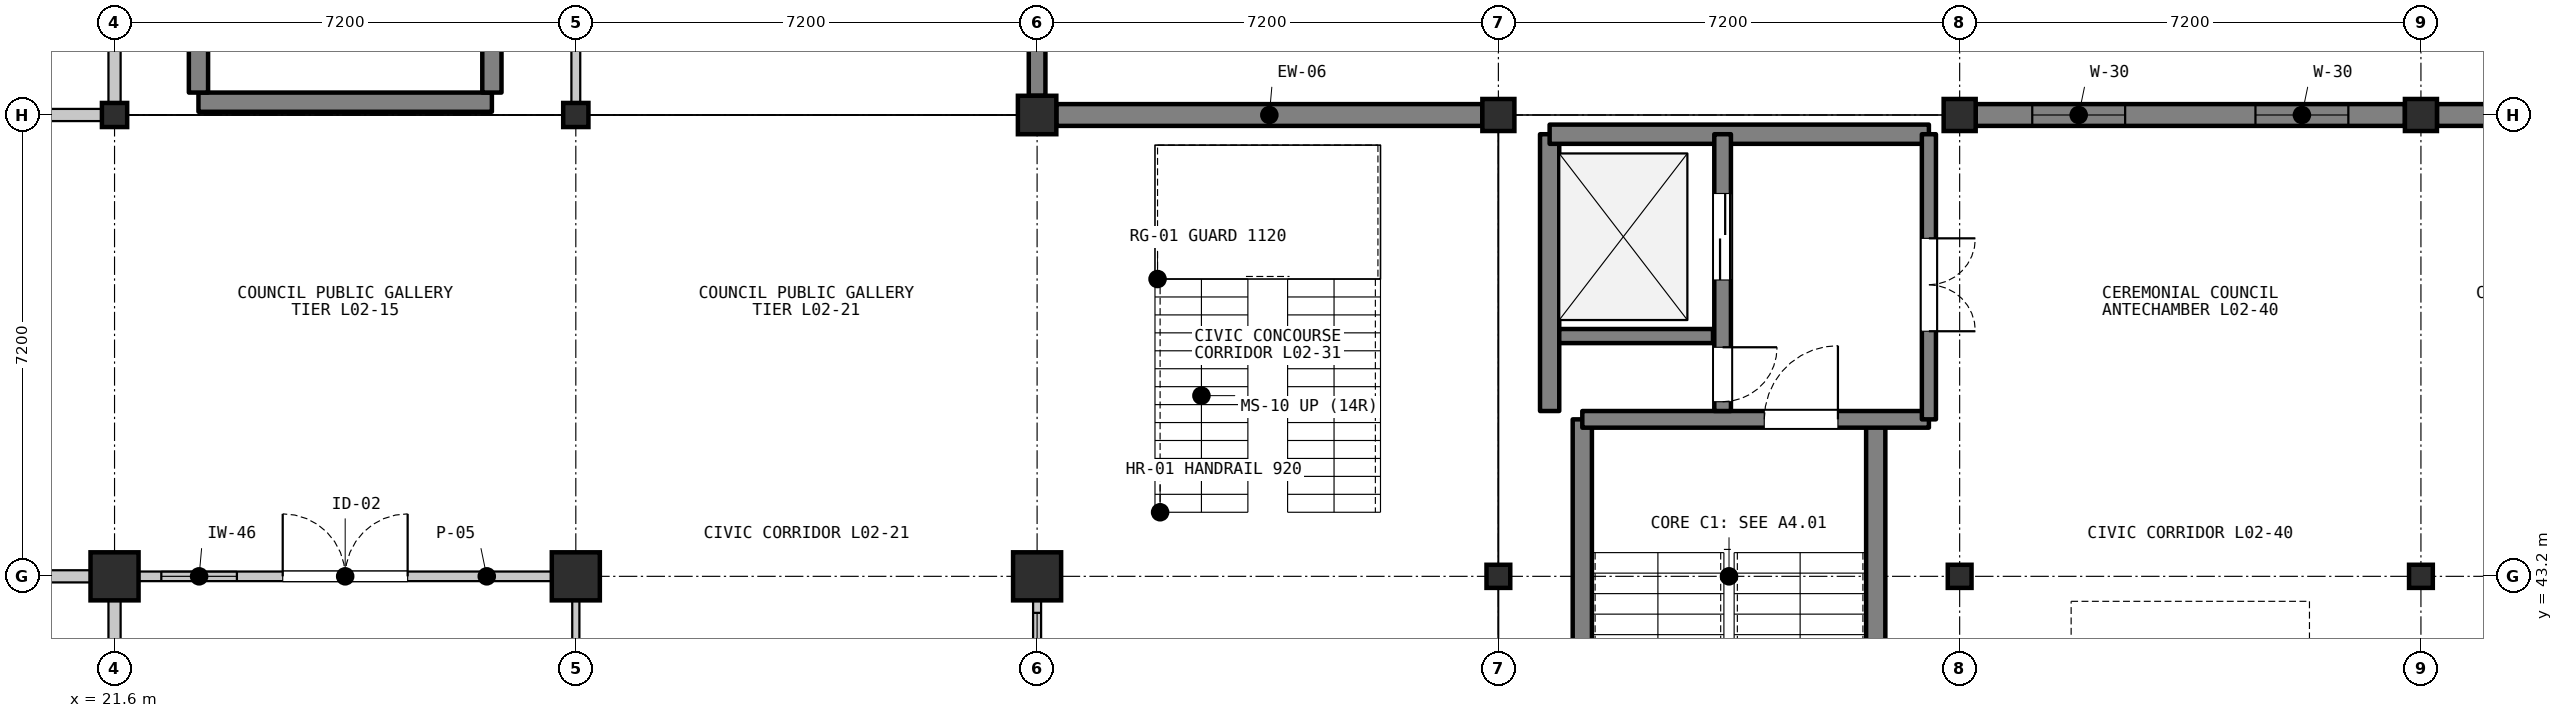
"""IFC4 building model, lengths in metres.
Left out: names, types, materials, properties, quantities, classifications, styles, units other than length and angle.
Written with IfcOpenShell. Run it as: python <this file> out.ifc"""

import sys

from ifc_helpers import new_model, si_unit, direction, frame, frame_2d, origin, origin_2d, place, context, subcontext, project, spatial, rectangle, i_section, extrude, element, fill, save


model = new_model("IFC4")
c1 = context("Model", 3, precision=1e-05, world=origin(), true_north=direction((0.0, 1.0)))
c2 = subcontext(c1, "Body", "Model", "MODEL_VIEW")
j1 = project(units=[si_unit("LENGTHUNIT", "METRE"), si_unit("PLANEANGLEUNIT", "RADIAN")], contexts=[c1])
p1 = place(None, origin())
s1 = spatial("IfcSite", under=j1, at=p1, CompositionType="ELEMENT")
p2 = place(p1, origin())
s2 = spatial("IfcBuilding", under=s1, at=p2, CompositionType="ELEMENT")
p3 = place(p2, frame((0.0, 0.0, 5.4)))
s3 = spatial("IfcBuildingStorey", under=s2, at=p3, CompositionType="ELEMENT", Elevation=5.4)
p4 = place(p3, frame((21.6, 43.2, 0.0), z_axis=(0.0, 0.0, 1.0), x_axis=(1.0, 0.0, 0.0)))
e1 = element("IfcColumn", 1, at=p4, inside=s3, PredefinedType="COLUMN", context=c2, shape_type="SweptSolid", body=[
    extrude(rectangle(XDim=0.75, YDim=0.75, at=origin_2d()), origin(), (0.0, 0.0, 1.0), 4.5),
])
p5 = place(p3, frame((21.6, 50.4, 0.0), z_axis=(0.0, 0.0, 1.0), x_axis=(1.0, 0.0, 0.0)))
e2 = element("IfcColumn", 2, at=p5, inside=s3, PredefinedType="COLUMN", context=c2, shape_type="SweptSolid", body=[
    extrude(i_section(OverallWidth=0.394, OverallDepth=0.376, WebThickness=0.017, FlangeThickness=0.028, FilletRadius=0.015, at=origin_2d()), origin(), (0.0, 0.0, 1.0), 4.5),
])
p6 = place(p3, frame((28.8, 43.2, 0.0), z_axis=(0.0, 0.0, 1.0), x_axis=(1.0, 0.0, 0.0)))
e3 = element("IfcColumn", 3, at=p6, inside=s3, PredefinedType="COLUMN", context=c2, shape_type="SweptSolid", body=[
    extrude(rectangle(XDim=0.75, YDim=0.75, at=origin_2d()), origin(), (0.0, 0.0, 1.0), 4.5),
])
p7 = place(p3, frame((28.8, 50.4, 0.0), z_axis=(0.0, 0.0, 1.0), x_axis=(1.0, 0.0, 0.0)))
e4 = element("IfcColumn", 4, at=p7, inside=s3, PredefinedType="COLUMN", context=c2, shape_type="SweptSolid", body=[
    extrude(i_section(OverallWidth=0.394, OverallDepth=0.376, WebThickness=0.017, FlangeThickness=0.028, FilletRadius=0.015, at=origin_2d()), origin(), (0.0, 0.0, 1.0), 4.5),
])
p8 = place(p3, frame((36.0, 43.2, 0.0), z_axis=(0.0, 0.0, 1.0), x_axis=(1.0, 0.0, 0.0)))
e5 = element("IfcColumn", 5, at=p8, inside=s3, PredefinedType="COLUMN", context=c2, shape_type="SweptSolid", body=[
    extrude(rectangle(XDim=0.75, YDim=0.75, at=origin_2d()), origin(), (0.0, 0.0, 1.0), 4.5),
])
p9 = place(p3, frame((36.0, 50.4, 0.0), z_axis=(0.0, 0.0, 1.0), x_axis=(1.0, 0.0, 0.0)))
e6 = element("IfcColumn", 6, at=p9, inside=s3, PredefinedType="COLUMN", context=c2, shape_type="SweptSolid", body=[
    extrude(rectangle(XDim=0.6, YDim=0.6, at=origin_2d()), origin(), (0.0, 0.0, 1.0), 4.5),
])
p10 = place(p3, frame((43.2, 43.2, 0.0), z_axis=(0.0, 0.0, 1.0), x_axis=(1.0, 0.0, 0.0)))
e7 = element("IfcColumn", 7, at=p10, inside=s3, PredefinedType="COLUMN", context=c2, shape_type="SweptSolid", body=[
    extrude(i_section(OverallWidth=0.371, OverallDepth=0.361, WebThickness=0.012, FlangeThickness=0.02, FilletRadius=0.015, at=origin_2d()), origin(), (0.0, 0.0, 1.0), 4.5),
])
p11 = place(p3, frame((43.2, 50.4, 0.0), z_axis=(0.0, 0.0, 1.0), x_axis=(1.0, 0.0, 0.0)))
e8 = element("IfcColumn", 8, at=p11, inside=s3, PredefinedType="COLUMN", context=c2, shape_type="SweptSolid", body=[
    extrude(rectangle(XDim=0.5, YDim=0.5, at=origin_2d()), origin(), (0.0, 0.0, 1.0), 4.5),
])
p12 = place(p3, frame((50.4, 43.2, 0.0), z_axis=(0.0, 0.0, 1.0), x_axis=(1.0, 0.0, 0.0)))
e9 = element("IfcColumn", 9, at=p12, inside=s3, PredefinedType="COLUMN", context=c2, shape_type="SweptSolid", body=[
    extrude(i_section(OverallWidth=0.371, OverallDepth=0.361, WebThickness=0.012, FlangeThickness=0.02, FilletRadius=0.015, at=origin_2d()), origin(), (0.0, 0.0, 1.0), 4.5),
])
p13 = place(p3, frame((50.4, 50.4, 0.0), z_axis=(0.0, 0.0, 1.0), x_axis=(1.0, 0.0, 0.0)))
e10 = element("IfcColumn", 10, at=p13, inside=s3, PredefinedType="COLUMN", context=c2, shape_type="SweptSolid", body=[
    extrude(rectangle(XDim=0.5, YDim=0.5, at=origin_2d()), origin(), (0.0, 0.0, 1.0), 4.5),
])
p14 = place(p3, frame((57.6, 43.2, 0.0), z_axis=(0.0, 0.0, 1.0), x_axis=(1.0, 0.0, 0.0)))
e11 = element("IfcColumn", 11, at=p14, inside=s3, PredefinedType="COLUMN", context=c2, shape_type="SweptSolid", body=[
    extrude(i_section(OverallWidth=0.371, OverallDepth=0.361, WebThickness=0.012, FlangeThickness=0.02, FilletRadius=0.015, at=origin_2d()), origin(), (0.0, 0.0, 1.0), 4.5),
])
p15 = place(p3, frame((57.6, 50.4, 0.0), z_axis=(0.0, 0.0, 1.0), x_axis=(1.0, 0.0, 0.0)))
e12 = element("IfcColumn", 12, at=p15, inside=s3, PredefinedType="COLUMN", context=c2, shape_type="SweptSolid", body=[
    extrude(rectangle(XDim=0.5, YDim=0.5, at=origin_2d()), origin(), (0.0, 0.0, 1.0), 4.5),
])
p16 = place(p3, frame((36.0, 57.3, 0.0), z_axis=(0.0, 0.0, 1.0), x_axis=(0.0, -1.0, 0.0)))
e13 = element("IfcWall", 13, at=p16, inside=s3, PredefinedType="SOLIDWALL", context=c2, shape_type="SweptSolid", body=[
    extrude(rectangle(XDim=6.6, YDim=0.26, at=frame_2d((3.3, 0.0))), origin(), (0.0, 0.0, 1.0), 3.767),
])
p17 = place(p16, frame((2.225, 0.0, 0.95)))
e14 = element("IfcOpeningElement", 14, at=p17, cuts=e13, PredefinedType="OPENING", context=c2, shape_type="SweptSolid", body=[
    extrude(rectangle(XDim=2.15, YDim=1.75, at=frame_2d((1.075, 0.875))), frame((0.0, 0.14, 0.0), z_axis=(0.0, -1.0, 0.0), x_axis=(1.0, 0.0, 0.0)), (0.0, 0.0, 1.0), 0.28),
])
p18 = place(p3, frame((36.3, 50.4, 0.0), z_axis=(0.0, 0.0, 1.0), x_axis=(1.0, 0.0, 0.0)))
e15 = element("IfcWall", 15, at=p18, inside=s3, PredefinedType="SOLIDWALL", context=c2, shape_type="SweptSolid", body=[
    extrude(rectangle(XDim=6.65, YDim=0.34, at=frame_2d((3.325, 0.0))), origin(), (0.0, 0.0, 1.0), 3.698),
])
p19 = place(p3, frame((50.65, 50.4, 0.0), z_axis=(0.0, 0.0, 1.0), x_axis=(1.0, 0.0, 0.0)))
e16 = element("IfcWall", 16, at=p19, inside=s3, PredefinedType="SOLIDWALL", context=c2, shape_type="SweptSolid", body=[
    extrude(rectangle(XDim=6.7, YDim=0.34, at=frame_2d((3.35, 0.0))), origin(), (0.0, 0.0, 1.0), 3.698),
])
p20 = place(p19, frame((0.883, 0.0, 0.95)))
e17 = element("IfcOpeningElement", 17, at=p20, cuts=e16, PredefinedType="OPENING", context=c2, shape_type="SweptSolid", body=[
    extrude(rectangle(XDim=1.45, YDim=2.15, at=frame_2d((0.725, 1.075))), frame((0.0, 0.18, 0.0), z_axis=(0.0, -1.0, 0.0), x_axis=(1.0, 0.0, 0.0)), (0.0, 0.0, 1.0), 0.36),
])
p21 = place(p19, frame((4.367, 0.0, 0.95)))
e18 = element("IfcOpeningElement", 18, at=p21, cuts=e16, PredefinedType="OPENING", context=c2, shape_type="SweptSolid", body=[
    extrude(rectangle(XDim=1.45, YDim=2.15, at=frame_2d((0.725, 1.075))), frame((0.0, 0.18, 0.0), z_axis=(0.0, -1.0, 0.0), x_axis=(1.0, 0.0, 0.0)), (0.0, 0.0, 1.0), 0.36),
])
p22 = place(p3, frame((57.85, 50.4, 0.0), z_axis=(0.0, 0.0, 1.0), x_axis=(1.0, 0.0, 0.0)))
e19 = element("IfcWall", 19, at=p22, inside=s3, PredefinedType="SOLIDWALL", context=c2, shape_type="SweptSolid", body=[
    extrude(rectangle(XDim=6.65, YDim=0.34, at=frame_2d((3.325, 0.0))), origin(), (0.0, 0.0, 1.0), 3.698),
])
for number, where, z_axis, x_axis in (
    (20, (44.51, 36.35, 0.0), (0.0, 0.0, 1.0), (0.0, 1.0, 0.0)),
    (21, (49.09, 36.35, 0.0), (0.0, 0.0, 1.0), (0.0, 1.0, 0.0)),
):
    element("IfcWall", number, at=place(p3, frame(where, z_axis=z_axis, x_axis=x_axis)), inside=s3, PredefinedType="SHEAR", context=c2, shape_type="SweptSolid", body=[
        extrude(rectangle(XDim=9.3, YDim=0.3, at=frame_2d((4.65, 0.0))), origin(), (0.0, 0.0, 1.0), 4.3),
    ])
p23 = place(p3, frame((44.51, 45.65, 0.0), z_axis=(0.0, 0.0, 1.0), x_axis=(1.0, 0.0, 0.0)))
e22 = element("IfcWall", 22, at=p23, inside=s3, PredefinedType="SHEAR", context=c2, shape_type="SweptSolid", body=[
    extrude(rectangle(XDim=5.41, YDim=0.26, at=frame_2d((2.705, 0.0))), origin(), (0.0, 0.0, 1.0), 4.3),
])
p24 = place(p23, frame((2.84, 0.0, 0.0)))
e23 = element("IfcOpeningElement", 23, at=p24, cuts=e22, PredefinedType="OPENING", context=c2, shape_type="SweptSolid", body=[
    extrude(rectangle(XDim=1.15, YDim=2.15, at=frame_2d((0.575, 1.075))), frame((0.0, 0.14, 0.0), z_axis=(0.0, -1.0, 0.0), x_axis=(1.0, 0.0, 0.0)), (0.0, 0.0, 1.0), 0.28),
])
p25 = place(p3, frame((44.0, 45.78, 0.0), z_axis=(0.0, 0.0, 1.0), x_axis=(0.0, 1.0, 0.0)))
e24 = element("IfcWall", 24, at=p25, inside=s3, PredefinedType="SHEAR", context=c2, shape_type="SweptSolid", body=[
    extrude(rectangle(XDim=4.32, YDim=0.3, at=frame_2d((2.16, 0.0))), origin(), (0.0, 0.0, 1.0), 4.3),
])
p26 = place(p3, frame((44.0, 50.1, 0.0), z_axis=(0.0, 0.0, 1.0), x_axis=(1.0, 0.0, 0.0)))
e25 = element("IfcWall", 25, at=p26, inside=s3, PredefinedType="SHEAR", context=c2, shape_type="SweptSolid", body=[
    extrude(rectangle(XDim=5.92, YDim=0.3, at=frame_2d((2.96, 0.0))), origin(), (0.0, 0.0, 1.0), 4.3),
])
p27 = place(p3, frame((44.15, 46.95, 0.0), z_axis=(0.0, 0.0, 1.0), x_axis=(1.0, 0.0, 0.0)))
e26 = element("IfcWall", 26, at=p27, inside=s3, PredefinedType="SHEAR", context=c2, shape_type="SweptSolid", body=[
    extrude(rectangle(XDim=2.4, YDim=0.22, at=frame_2d((1.2, 0.0))), origin(), (0.0, 0.0, 1.0), 4.3),
])
p28 = place(p3, frame((46.7, 50.1, 0.0), z_axis=(0.0, 0.0, 1.0), x_axis=(0.0, -1.0, 0.0)))
e27 = element("IfcWall", 27, at=p28, inside=s3, PredefinedType="SHEAR", context=c2, shape_type="SweptSolid", body=[
    extrude(rectangle(XDim=4.32, YDim=0.26, at=frame_2d((2.16, 0.0))), origin(), (0.0, 0.0, 1.0), 4.3),
])
p29 = place(p28, frame((0.925, 0.0, 0.0)))
e28 = element("IfcOpeningElement", 28, at=p29, cuts=e27, PredefinedType="OPENING", context=c2, shape_type="SweptSolid", body=[
    extrude(rectangle(XDim=1.35, YDim=2.2, at=frame_2d((0.675, 1.1))), frame((0.0, 0.14, 0.0), z_axis=(0.0, -1.0, 0.0), x_axis=(1.0, 0.0, 0.0)), (0.0, 0.0, 1.0), 0.28),
])
p30 = place(p28, frame((3.325, 0.0, 0.0)))
e29 = element("IfcOpeningElement", 29, at=p30, cuts=e27, PredefinedType="OPENING", context=c2, shape_type="SweptSolid", body=[
    extrude(rectangle(XDim=0.85, YDim=2.05, at=frame_2d((0.425, 1.025))), frame((0.0, 0.14, 0.0), z_axis=(0.0, -1.0, 0.0), x_axis=(1.0, 0.0, 0.0)), (0.0, 0.0, 1.0), 0.28),
])
p31 = place(p3, frame((49.92, 50.1, 0.0), z_axis=(0.0, 0.0, 1.0), x_axis=(0.0, -1.0, 0.0)))
e30 = element("IfcWall", 30, at=p31, inside=s3, PredefinedType="SHEAR", context=c2, shape_type="SweptSolid", body=[
    extrude(rectangle(XDim=4.45, YDim=0.22, at=frame_2d((2.225, 0.0))), origin(), (0.0, 0.0, 1.0), 4.3),
])
p32 = place(p31, frame((1.625, 0.0, 0.0)))
e31 = element("IfcOpeningElement", 31, at=p32, cuts=e30, PredefinedType="OPENING", context=c2, shape_type="SweptSolid", body=[
    extrude(rectangle(XDim=1.45, YDim=2.2, at=frame_2d((0.725, 1.1))), frame((0.0, 0.12, 0.0), z_axis=(0.0, -1.0, 0.0), x_axis=(1.0, 0.0, 0.0)), (0.0, 0.0, 1.0), 0.24),
])
p33 = place(p3, frame((22.91, 50.6, 0.0), z_axis=(0.0, 0.0, 1.0), x_axis=(1.0, 0.0, 0.0)))
e32 = element("IfcWall", 32, at=p33, inside=s3, PredefinedType="SHEAR", context=c2, shape_type="SweptSolid", body=[
    extrude(rectangle(XDim=4.58, YDim=0.3, at=frame_2d((2.29, 0.0))), origin(), (0.0, 0.0, 1.0), 4.3),
])
for number, where, z_axis, x_axis in (
    (33, (22.91, 50.75, 0.0), (0.0, 0.0, 1.0), (0.0, 1.0, 0.0)),
    (34, (27.49, 50.75, 0.0), (0.0, 0.0, 1.0), (0.0, 1.0, 0.0)),
):
    element("IfcWall", number, at=place(p3, frame(where, z_axis=z_axis, x_axis=x_axis)), inside=s3, PredefinedType="SHEAR", context=c2, shape_type="SweptSolid", body=[
        extrude(rectangle(XDim=9.3, YDim=0.3, at=frame_2d((4.65, 0.0))), origin(), (0.0, 0.0, 1.0), 4.3),
    ])
p34 = place(p3, frame((18.12, 43.2, 0.0), z_axis=(0.0, 0.0, 1.0), x_axis=(1.0, 0.0, 0.0)))
e35 = element("IfcWall", 35, at=p34, inside=s3, PredefinedType="PARTITIONING", context=c2, shape_type="SweptSolid", body=[
    extrude(rectangle(XDim=3.2, YDim=0.19, at=frame_2d((1.6, 0.0))), origin(), (0.0, 0.0, 1.0), 3.688),
])
p35 = place(p34, frame((1.14, 0.0, 0.0)))
e36 = element("IfcOpeningElement", 36, at=p35, cuts=e35, PredefinedType="OPENING", context=c2, shape_type="SweptSolid", body=[
    extrude(rectangle(XDim=0.92, YDim=2.1, at=frame_2d((0.46, 1.05))), frame((0.0, 0.105, 0.0), z_axis=(0.0, -1.0, 0.0), x_axis=(1.0, 0.0, 0.0)), (0.0, 0.0, 1.0), 0.21),
])
p36 = place(p3, frame((21.6, 42.92, 0.0), z_axis=(0.0, 0.0, 1.0), x_axis=(0.0, -1.0, 0.0)))
e37 = element("IfcWall", 37, at=p36, inside=s3, PredefinedType="PARTITIONING", context=c2, shape_type="SweptSolid", body=[
    extrude(rectangle(XDim=6.8, YDim=0.19, at=frame_2d((3.4, 0.0))), origin(), (0.0, 0.0, 1.0), 4.3),
])
p37 = place(p3, frame((21.48, 50.4, 0.0), z_axis=(0.0, 0.0, 1.0), x_axis=(-1.0, 0.0, 0.0)))
e38 = element("IfcWall", 38, at=p37, inside=s3, PredefinedType="PARTITIONING", context=c2, shape_type="SweptSolid", body=[
    extrude(rectangle(XDim=3.96, YDim=0.19, at=frame_2d((1.98, 0.0))), origin(), (0.0, 0.0, 1.0), 3.688),
])
p38 = place(p37, frame((1.52, 0.0, 0.0)))
e39 = element("IfcOpeningElement", 39, at=p38, cuts=e38, PredefinedType="OPENING", context=c2, shape_type="SweptSolid", body=[
    extrude(rectangle(XDim=0.92, YDim=2.1, at=frame_2d((0.46, 1.05))), frame((0.0, 0.105, 0.0), z_axis=(0.0, -1.0, 0.0), x_axis=(1.0, 0.0, 0.0)), (0.0, 0.0, 1.0), 0.21),
])
p39 = place(p3, frame((21.6, 57.32, 0.0), z_axis=(0.0, 0.0, 1.0), x_axis=(0.0, -1.0, 0.0)))
e40 = element("IfcWall", 40, at=p39, inside=s3, PredefinedType="PARTITIONING", context=c2, shape_type="SweptSolid", body=[
    extrude(rectangle(XDim=6.8, YDim=0.19, at=frame_2d((3.4, 0.0))), origin(), (0.0, 0.0, 1.0), 3.688),
])
p40 = place(p3, frame((21.88, 43.2, 0.0), z_axis=(0.0, 0.0, 1.0), x_axis=(1.0, 0.0, 0.0)))
e41 = element("IfcWall", 41, at=p40, inside=s3, PredefinedType="PARTITIONING", context=c2, shape_type="SweptSolid", body=[
    extrude(rectangle(XDim=6.64, YDim=0.15, at=frame_2d((3.32, 0.0))), origin(), (0.0, 0.0, 1.0), 3.688),
])
p41 = place(p40, frame((2.345, 0.0, 0.0)))
e42 = element("IfcOpeningElement", 42, at=p41, cuts=e41, PredefinedType="OPENING", context=c2, shape_type="SweptSolid", body=[
    extrude(rectangle(XDim=1.95, YDim=2.5, at=frame_2d((0.975, 1.25))), frame((0.0, 0.085, 0.0), z_axis=(0.0, -1.0, 0.0), x_axis=(1.0, 0.0, 0.0)), (0.0, 0.0, 1.0), 0.17),
])
p42 = place(p40, frame((0.45, 0.0, 1.05)))
e43 = element("IfcOpeningElement", 43, at=p42, cuts=e41, PredefinedType="OPENING", context=c2, shape_type="SweptSolid", body=[
    extrude(rectangle(XDim=1.18, YDim=1.44, at=frame_2d((0.59, 0.72))), frame((0.0, 0.085, 0.0), z_axis=(0.0, -1.0, 0.0), x_axis=(1.0, 0.0, 0.0)), (0.0, 0.0, 1.0), 0.17),
])
p43 = place(p3, frame((28.8, 42.92, 0.0), z_axis=(0.0, 0.0, 1.0), x_axis=(0.0, -1.0, 0.0)))
e44 = element("IfcWall", 44, at=p43, inside=s3, PredefinedType="PARTITIONING", context=c2, shape_type="SweptSolid", body=[
    extrude(rectangle(XDim=6.8, YDim=0.112, at=frame_2d((3.4, 0.0))), origin(), (0.0, 0.0, 1.0), 4.3),
])
p44 = place(p3, frame((36.0, 43.08, 0.0), z_axis=(0.0, 0.0, 1.0), x_axis=(0.0, -1.0, 0.0)))
e45 = element("IfcWall", 45, at=p44, inside=s3, PredefinedType="PARTITIONING", context=c2, shape_type="SweptSolid", body=[
    extrude(rectangle(XDim=6.96, YDim=0.125, at=frame_2d((3.48, 0.0))), origin(), (0.0, 0.0, 1.0), 3.688),
])
p45 = place(p44, frame((2.86, 0.0, 0.0)))
e46 = element("IfcOpeningElement", 46, at=p45, cuts=e45, PredefinedType="OPENING", context=c2, shape_type="SweptSolid", body=[
    extrude(rectangle(XDim=1.24, YDim=2.22, at=frame_2d((0.62, 1.11))), frame((0.0, 0.073, 0.0), z_axis=(0.0, -1.0, 0.0), x_axis=(1.0, 0.0, 0.0)), (0.0, 0.0, 1.0), 0.145),
])
p46 = place(p44, frame((0.45, 0.0, 1.05)))
e47 = element("IfcOpeningElement", 47, at=p46, cuts=e45, PredefinedType="OPENING", context=c2, shape_type="SweptSolid", body=[
    extrude(rectangle(XDim=1.28, YDim=1.44, at=frame_2d((0.64, 0.72))), frame((0.0, 0.073, 0.0), z_axis=(0.0, -1.0, 0.0), x_axis=(1.0, 0.0, 0.0)), (0.0, 0.0, 1.0), 0.145),
])
p47 = place(p3, frame((28.8, 50.52, 0.0), z_axis=(0.0, 0.0, 1.0), x_axis=(0.0, 1.0, 0.0)))
e48 = element("IfcWall", 48, at=p47, inside=s3, PredefinedType="PARTITIONING", context=c2, shape_type="SweptSolid", body=[
    extrude(rectangle(XDim=6.8, YDim=0.138, at=frame_2d((3.4, 0.0))), origin(), (0.0, 0.0, 1.0), 3.688),
])
p48 = place(p20, origin())
e49 = element("IfcWindow", 49, at=p48, inside=s3, PartitioningType="SINGLE_PANEL", PredefinedType="WINDOW", context=c2, shape_type="SweptSolid", body=[
    extrude(rectangle(XDim=1.45, YDim=2.15, at=frame_2d((0.725, 1.075))), frame((0.0, 0.03, 0.0), z_axis=(0.0, -1.0, 0.0), x_axis=(1.0, 0.0, 0.0)), (0.0, 0.0, 1.0), 0.06),
])
fill(e17, e49)
p49 = place(p21, origin())
e50 = element("IfcWindow", 50, at=p49, inside=s3, PartitioningType="SINGLE_PANEL", PredefinedType="WINDOW", context=c2, shape_type="SweptSolid", body=[
    extrude(rectangle(XDim=1.45, YDim=2.15, at=frame_2d((0.725, 1.075))), frame((0.0, 0.03, 0.0), z_axis=(0.0, -1.0, 0.0), x_axis=(1.0, 0.0, 0.0)), (0.0, 0.0, 1.0), 0.06),
])
fill(e18, e50)
p50 = place(p24, origin())
e51 = element("IfcDoor", 51, at=p50, inside=s3, OperationType="SINGLE_SWING_RIGHT", PredefinedType="DOOR", context=c2, shape_type="SweptSolid", body=[
    extrude(rectangle(XDim=1.15, YDim=2.15, at=frame_2d((0.575, 1.075))), frame((0.0, 0.025, 0.0), z_axis=(0.0, -1.0, 0.0), x_axis=(1.0, 0.0, 0.0)), (0.0, 0.0, 1.0), 0.05),
])
fill(e23, e51)
p51 = place(p29, origin())
e52 = element("IfcDoor", 52, at=p51, inside=s3, OperationType="DOUBLE_DOOR_SLIDING", PredefinedType="DOOR", context=c2, shape_type="SweptSolid", body=[
    extrude(rectangle(XDim=1.35, YDim=2.2, at=frame_2d((0.675, 1.1))), frame((0.0, 0.025, 0.0), z_axis=(0.0, -1.0, 0.0), x_axis=(1.0, 0.0, 0.0)), (0.0, 0.0, 1.0), 0.05),
])
fill(e28, e52)
p52 = place(p30, origin())
e53 = element("IfcDoor", 53, at=p52, inside=s3, OperationType="SINGLE_SWING_LEFT", PredefinedType="DOOR", context=c2, shape_type="SweptSolid", body=[
    extrude(rectangle(XDim=0.85, YDim=2.05, at=frame_2d((0.425, 1.025))), frame((0.0, 0.025, 0.0), z_axis=(0.0, -1.0, 0.0), x_axis=(1.0, 0.0, 0.0)), (0.0, 0.0, 1.0), 0.05),
])
fill(e29, e53)
p53 = place(p32, origin())
e54 = element("IfcDoor", 54, at=p53, inside=s3, OperationType="DOUBLE_DOOR_SINGLE_SWING", PredefinedType="DOOR", context=c2, shape_type="SweptSolid", body=[
    extrude(rectangle(XDim=1.45, YDim=2.2, at=frame_2d((0.725, 1.1))), frame((0.0, 0.025, 0.0), z_axis=(0.0, -1.0, 0.0), x_axis=(1.0, 0.0, 0.0)), (0.0, 0.0, 1.0), 0.05),
])
fill(e31, e54)
p54 = place(p41, origin())
e55 = element("IfcDoor", 55, at=p54, inside=s3, OperationType="DOUBLE_DOOR_SINGLE_SWING", PredefinedType="DOOR", context=c2, shape_type="SweptSolid", body=[
    extrude(rectangle(XDim=1.95, YDim=2.5, at=frame_2d((0.975, 1.25))), frame((0.0, 0.025, 0.0), z_axis=(0.0, -1.0, 0.0), x_axis=(1.0, 0.0, 0.0)), (0.0, 0.0, 1.0), 0.05),
])
fill(e42, e55)
p55 = place(p42, origin())
e56 = element("IfcWindow", 56, at=p55, inside=s3, PartitioningType="SINGLE_PANEL", PredefinedType="WINDOW", context=c2, shape_type="SweptSolid", body=[
    extrude(rectangle(XDim=1.18, YDim=1.44, at=frame_2d((0.59, 0.72))), frame((0.0, 0.03, 0.0), z_axis=(0.0, -1.0, 0.0), x_axis=(1.0, 0.0, 0.0)), (0.0, 0.0, 1.0), 0.06),
])
fill(e43, e56)
p56 = place(p46, origin())
e57 = element("IfcWindow", 57, at=p56, inside=s3, PartitioningType="SINGLE_PANEL", PredefinedType="WINDOW", context=c2, shape_type="SweptSolid", body=[
    extrude(rectangle(XDim=1.28, YDim=1.44, at=frame_2d((0.64, 0.72))), frame((0.0, 0.03, 0.0), z_axis=(0.0, -1.0, 0.0), x_axis=(1.0, 0.0, 0.0)), (0.0, 0.0, 1.0), 0.06),
])
fill(e47, e57)
save(model, sys.argv[1])
